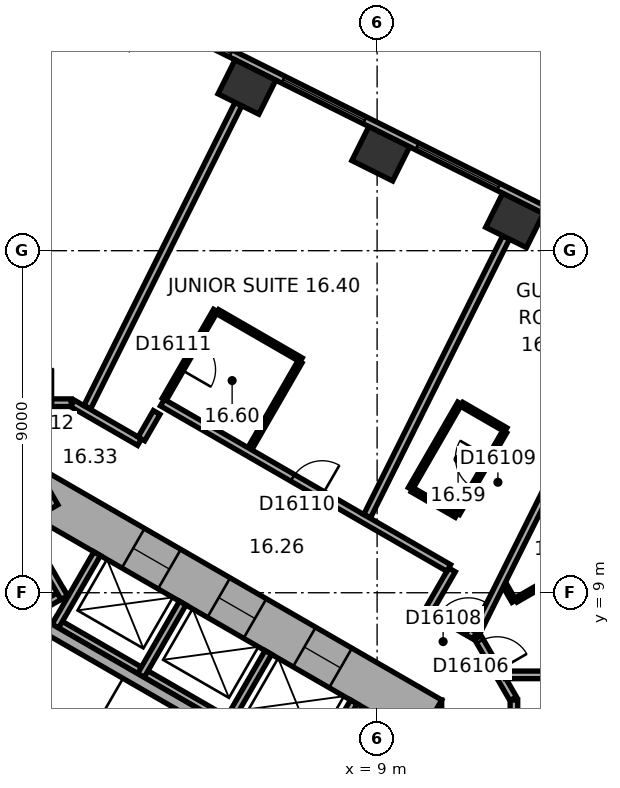
"""IFC4 building model, lengths in metres.
Left out: names, types, materials, properties, quantities, classifications, styles, units other than length and angle.
Written with IfcOpenShell. Run it as: python <this file> out.ifc"""

import sys

from ifc_helpers import new_model, si_unit, direction, frame, frame_2d, origin, origin_2d, place, context, subcontext, project, spatial, rectangle, extrude, element, fill, save


model = new_model("IFC4")
c1 = context("Model", 3, precision=1e-05, world=origin(), true_north=direction((0.0, 1.0)))
c2 = subcontext(c1, "Body", "Model", "MODEL_VIEW")
j1 = project(units=[si_unit("LENGTHUNIT", "METRE"), si_unit("PLANEANGLEUNIT", "RADIAN")], contexts=[c1])
p1 = place(None, origin())
s1 = spatial("IfcSite", under=j1, at=p1, CompositionType="ELEMENT")
p2 = place(p1, origin())
s2 = spatial("IfcBuilding", under=s1, at=p2, CompositionType="ELEMENT")
p3 = place(p2, frame((0.0, 0.0, 73.7)))
s3 = spatial("IfcBuildingStorey", under=s2, at=p3, CompositionType="ELEMENT", Elevation=73.7)
for number, where, z_axis, x_axis in (
    (1, (12.616, 18.795, 0.0), (0.0, 0.0, 1.0), (-0.895, 0.446, 0.0)),
    (2, (9.095, 20.551, 0.0), (0.0, 0.0, 1.0), (-0.895, 0.446, 0.0)),
    (3, (5.574, 22.306, 0.0), (0.0, 0.0, 1.0), (-0.895, 0.446, 0.0)),
):
    element("IfcColumn", number, at=place(p3, frame(where, z_axis=z_axis, x_axis=x_axis)), inside=s3, PredefinedType="COLUMN", context=c2, shape_type="SweptSolid", body=[
        extrude(rectangle(XDim=1.2, YDim=1.0, at=origin_2d()), origin(), (0.0, 0.0, 1.0), 3.3),
    ])
p4 = place(p3, frame((10.1, -6.177, 0.0), z_axis=(0.0, 0.0, 1.0), x_axis=(0.0, 1.0, 0.0)))
e4 = element("IfcWall", 4, at=p4, inside=s3, PredefinedType="SHEAR", context=c2, shape_type="SweptSolid", body=[
    extrude(rectangle(XDim=12.355, YDim=1.2, at=frame_2d((6.177, 0.0))), origin(), (0.0, 0.0, 1.0), 3.3),
])
p5 = place(p4, frame((6.378, 0.0, 0.0)))
e5 = element("IfcOpeningElement", 5, at=p5, cuts=e4, PredefinedType="OPENING", context=c2, shape_type="SweptSolid", body=[
    extrude(rectangle(XDim=1.5, YDim=2.1, at=frame_2d((0.75, 1.05))), frame((0.0, 0.61, 0.0), z_axis=(0.0, -1.0, 0.0), x_axis=(1.0, 0.0, 0.0)), (0.0, 0.0, 1.0), 1.22),
])
p6 = place(p4, frame((1.828, 0.0, 0.0)))
e6 = element("IfcOpeningElement", 6, at=p6, cuts=e4, PredefinedType="OPENING", context=c2, shape_type="SweptSolid", body=[
    extrude(rectangle(XDim=1.1, YDim=2.1, at=frame_2d((0.55, 1.05))), frame((0.0, 0.61, 0.0), z_axis=(0.0, -1.0, 0.0), x_axis=(1.0, 0.0, 0.0)), (0.0, 0.0, 1.0), 1.22),
])
p7 = place(p4, frame((4.427, 0.0, 0.0)))
e7 = element("IfcOpeningElement", 7, at=p7, cuts=e4, PredefinedType="OPENING", context=c2, shape_type="SweptSolid", body=[
    extrude(rectangle(XDim=1.1, YDim=2.1, at=frame_2d((0.55, 1.05))), frame((0.0, 0.61, 0.0), z_axis=(0.0, -1.0, 0.0), x_axis=(1.0, 0.0, 0.0)), (0.0, 0.0, 1.0), 1.22),
])
p8 = place(p3, frame((10.4, 5.658, 0.0), z_axis=(0.0, 0.0, 1.0), x_axis=(-0.866021384402, 0.500006961711, 0.0)))
e8 = element("IfcWall", 8, at=p8, inside=s3, PredefinedType="SHEAR", context=c2, shape_type="SweptSolid", body=[
    extrude(rectangle(XDim=12.355, YDim=1.2, at=frame_2d((6.178, 0.0))), origin(), (0.0, 0.0, 1.0), 3.3),
])
p9 = place(p8, frame((2.728, 0.0, 0.0)))
e9 = element("IfcOpeningElement", 9, at=p9, cuts=e8, PredefinedType="OPENING", context=c2, shape_type="SweptSolid", body=[
    extrude(rectangle(XDim=1.1, YDim=2.1, at=frame_2d((0.55, 1.05))), frame((0.0, 0.61, 0.0), z_axis=(0.0, -1.0, 0.0), x_axis=(1.0, 0.0, 0.0)), (0.0, 0.0, 1.0), 1.22),
])
p10 = place(p8, frame((5.328, 0.0, 0.0)))
e10 = element("IfcOpeningElement", 10, at=p10, cuts=e8, PredefinedType="OPENING", context=c2, shape_type="SweptSolid", body=[
    extrude(rectangle(XDim=1.1, YDim=2.1, at=frame_2d((0.55, 1.05))), frame((0.0, 0.61, 0.0), z_axis=(0.0, -1.0, 0.0), x_axis=(1.0, 0.0, 0.0)), (0.0, 0.0, 1.0), 1.22),
])
p11 = place(p8, frame((7.928, 0.0, 0.0)))
e11 = element("IfcOpeningElement", 11, at=p11, cuts=e8, PredefinedType="OPENING", context=c2, shape_type="SweptSolid", body=[
    extrude(rectangle(XDim=1.1, YDim=2.1, at=frame_2d((0.55, 1.05))), frame((0.0, 0.61, 0.0), z_axis=(0.0, -1.0, 0.0), x_axis=(1.0, 0.0, 0.0)), (0.0, 0.0, 1.0), 1.22),
])
p12 = place(p3, frame((0.3, 11.836, 0.0), z_axis=(0.0, 0.0, 1.0), x_axis=(-0.866021384402, -0.500006961711, 0.0)))
e12 = element("IfcWall", 12, at=p12, inside=s3, PredefinedType="SHEAR", context=c2, shape_type="SweptSolid", body=[
    extrude(rectangle(XDim=12.355, YDim=1.2, at=frame_2d((6.178, 0.0))), origin(), (0.0, 0.0, 1.0), 3.3),
])
p13 = place(p12, frame((6.378, 0.0, 0.0)))
e13 = element("IfcOpeningElement", 13, at=p13, cuts=e12, PredefinedType="OPENING", context=c2, shape_type="SweptSolid", body=[
    extrude(rectangle(XDim=1.5, YDim=2.1, at=frame_2d((0.75, 1.05))), frame((0.0, 0.61, 0.0), z_axis=(0.0, -1.0, 0.0), x_axis=(1.0, 0.0, 0.0)), (0.0, 0.0, 1.0), 1.22),
])
p14 = place(p12, frame((1.828, 0.0, 0.0)))
e14 = element("IfcOpeningElement", 14, at=p14, cuts=e12, PredefinedType="OPENING", context=c2, shape_type="SweptSolid", body=[
    extrude(rectangle(XDim=1.1, YDim=2.1, at=frame_2d((0.55, 1.05))), frame((0.0, 0.61, 0.0), z_axis=(0.0, -1.0, 0.0), x_axis=(1.0, 0.0, 0.0)), (0.0, 0.0, 1.0), 1.22),
])
p15 = place(p3, frame((20.63, 15.47, 0.0), z_axis=(0.0, 0.0, 1.0), x_axis=(-0.894934518609, 0.446197498203, 0.0)))
e15 = element("IfcWall", 15, at=p15, inside=s3, PredefinedType="STANDARD", context=c2, shape_type="SweptSolid", body=[
    extrude(rectangle(XDim=21.246, YDim=0.2, at=frame_2d((10.623, 0.0))), origin(), (0.0, 0.0, 1.0), 3.3),
])
p16 = place(p15, frame((1.553, 0.0, 0.8)))
e16 = element("IfcOpeningElement", 16, at=p16, cuts=e15, PredefinedType="OPENING", context=c2, shape_type="SweptSolid", body=[
    extrude(rectangle(XDim=2.4, YDim=1.7, at=frame_2d((1.2, 0.85))), frame((0.0, 0.11, 0.0), z_axis=(0.0, -1.0, 0.0), x_axis=(1.0, 0.0, 0.0)), (0.0, 0.0, 1.0), 0.22),
])
p17 = place(p15, frame((5.488, 0.0, 0.8)))
e17 = element("IfcOpeningElement", 17, at=p17, cuts=e15, PredefinedType="OPENING", context=c2, shape_type="SweptSolid", body=[
    extrude(rectangle(XDim=2.4, YDim=1.7, at=frame_2d((1.2, 0.85))), frame((0.0, 0.11, 0.0), z_axis=(0.0, -1.0, 0.0), x_axis=(1.0, 0.0, 0.0)), (0.0, 0.0, 1.0), 0.22),
])
p18 = place(p15, frame((9.422, 0.0, 0.8)))
e18 = element("IfcOpeningElement", 18, at=p18, cuts=e15, PredefinedType="OPENING", context=c2, shape_type="SweptSolid", body=[
    extrude(rectangle(XDim=2.4, YDim=1.7, at=frame_2d((1.2, 0.85))), frame((0.0, 0.11, 0.0), z_axis=(0.0, -1.0, 0.0), x_axis=(1.0, 0.0, 0.0)), (0.0, 0.0, 1.0), 0.22),
])
p19 = place(p15, frame((13.357, 0.0, 0.8)))
e19 = element("IfcOpeningElement", 19, at=p19, cuts=e15, PredefinedType="OPENING", context=c2, shape_type="SweptSolid", body=[
    extrude(rectangle(XDim=2.4, YDim=1.7, at=frame_2d((1.2, 0.85))), frame((0.0, 0.11, 0.0), z_axis=(0.0, -1.0, 0.0), x_axis=(1.0, 0.0, 0.0)), (0.0, 0.0, 1.0), 0.22),
])
p20 = place(p15, frame((17.292, 0.0, 0.8)))
e20 = element("IfcOpeningElement", 20, at=p20, cuts=e15, PredefinedType="OPENING", context=c2, shape_type="SweptSolid", body=[
    extrude(rectangle(XDim=2.4, YDim=1.7, at=frame_2d((1.2, 0.85))), frame((0.0, 0.11, 0.0), z_axis=(0.0, -1.0, 0.0), x_axis=(1.0, 0.0, 0.0)), (0.0, 0.0, 1.0), 0.22),
])
p21 = place(p3, frame((7.424, 4.259, 0.0), z_axis=(0.0, 0.0, 1.0), x_axis=(-0.866026010844, 0.49999894854, 0.0)))
e21 = element("IfcWall", 21, at=p21, inside=s3, PredefinedType="PARTITIONING", context=c2, shape_type="SweptSolid", body=[
    extrude(rectangle(XDim=8.0, YDim=0.2, at=frame_2d((4.0, 0.0))), origin(), (0.0, 0.0, 1.0), 2.95),
])
for number, where, z_axis, x_axis in (
    (22, (7.287, 4.222, 0.0), (0.0, 0.0, 1.0), (0.5, 0.866, 0.0)),
    (23, (5.036, 5.522, 0.0), (0.0, 0.0, 1.0), (0.5, 0.866, 0.0)),
    (24, (2.784, 6.822, 0.0), (0.0, 0.0, 1.0), (0.5, 0.866, 0.0)),
    (25, (0.532, 8.122, 0.0), (0.0, 0.0, 1.0), (0.5, 0.866, 0.0)),
):
    element("IfcWall", number, at=place(p3, frame(where, z_axis=z_axis, x_axis=x_axis)), inside=s3, PredefinedType="PARTITIONING", context=c2, shape_type="SweptSolid", body=[
        extrude(rectangle(XDim=2.2, YDim=0.2, at=frame_2d((1.1, 0.0))), origin(), (0.0, 0.0, 1.0), 2.95),
    ])
p22 = place(p3, frame((0.803, 9.009, 0.0), z_axis=(0.0, 0.0, 1.0), x_axis=(-0.866028230842, -0.499995103361, 0.0)))
e26 = element("IfcWall", 26, at=p22, inside=s3, PredefinedType="PARTITIONING", context=c2, shape_type="SweptSolid", body=[
    extrude(rectangle(XDim=5.4, YDim=0.2, at=frame_2d((2.7, 0.0))), origin(), (0.0, 0.0, 1.0), 2.95),
])
p23 = place(p3, frame((0.767, 8.872, 0.0), z_axis=(0.0, 0.0, 1.0), x_axis=(-0.499994660107, 0.866028486751, 0.0)))
e27 = element("IfcWall", 27, at=p23, inside=s3, PredefinedType="PARTITIONING", context=c2, shape_type="SweptSolid", body=[
    extrude(rectangle(XDim=2.2, YDim=0.2, at=frame_2d((1.1, 0.0))), origin(), (0.0, 0.0, 1.0), 2.95),
])
p24 = place(p3, frame((6.303, 4.617, 0.0), z_axis=(0.0, 0.0, 1.0), x_axis=(-0.866027801685, 0.499995846692, 0.0)))
e28 = element("IfcWall", 28, at=p24, inside=s3, PredefinedType="SHEAR", context=c2, shape_type="SweptSolid", body=[
    extrude(rectangle(XDim=7.06, YDim=0.3, at=frame_2d((3.53, 0.0))), origin(), (0.0, 0.0, 1.0), 2.95),
])
p25 = place(p3, frame((0.95, 14.001, 0.0), z_axis=(0.0, 0.0, 1.0), x_axis=(-1.0, 0.0, 0.0)))
e29 = element("IfcWall", 29, at=p25, inside=s3, PredefinedType="PARTITIONING", context=c2, shape_type="SweptSolid", body=[
    extrude(rectangle(XDim=1.86, YDim=0.2, at=frame_2d((0.93, 0.0))), origin(), (0.0, 0.0, 1.0), 2.95),
])
p26 = place(p25, frame((0.48, 0.0, 0.0)))
e30 = element("IfcOpeningElement", 30, at=p26, cuts=e29, PredefinedType="OPENING", context=c2, shape_type="SweptSolid", body=[
    extrude(rectangle(XDim=0.9, YDim=2.1, at=frame_2d((0.45, 1.05))), frame((0.0, 0.11, 0.0), z_axis=(0.0, -1.0, 0.0), x_axis=(1.0, 0.0, 0.0)), (0.0, 0.0, 1.0), 0.22),
])
p27 = place(p3, frame((2.748, 12.962, 0.0), z_axis=(0.0, 0.0, 1.0), x_axis=(-0.866013897511, 0.50001992892, 0.0)))
e31 = element("IfcWall", 31, at=p27, inside=s3, PredefinedType="PARTITIONING", context=c2, shape_type="SweptSolid", body=[
    extrude(rectangle(XDim=2.037, YDim=0.2, at=frame_2d((1.018, 0.0))), origin(), (0.0, 0.0, 1.0), 2.95),
])
p28 = place(p3, frame((3.199, 13.743, 0.0), z_axis=(0.0, 0.0, 1.0), x_axis=(-0.500170954823, -0.865926680471, 0.0)))
e32 = element("IfcWall", 32, at=p28, inside=s3, PredefinedType="PARTITIONING", context=c2, shape_type="SweptSolid", body=[
    extrude(rectangle(XDim=0.801, YDim=0.2, at=frame_2d((0.4, 0.0))), origin(), (0.0, 0.0, 1.0), 2.95),
])
p29 = place(p3, frame((3.399, 14.089, 0.0), z_axis=(0.0, 0.0, 1.0), x_axis=(0.4999416173, 0.866059108428, 0.0)))
e33 = element("IfcWall", 33, at=p29, inside=s3, PredefinedType="PARTITIONING", context=c2, shape_type="SweptSolid", body=[
    extrude(rectangle(XDim=2.7, YDim=0.12, at=frame_2d((1.35, 0.0))), origin(), (0.0, 0.0, 1.0), 2.95),
])
p30 = place(p29, frame((0.9, 0.0, 0.0)))
e34 = element("IfcOpeningElement", 34, at=p30, cuts=e33, PredefinedType="OPENING", context=c2, shape_type="SweptSolid", body=[
    extrude(rectangle(XDim=0.9, YDim=2.1, at=frame_2d((0.45, 1.05))), frame((0.0, 0.07, 0.0), z_axis=(0.0, -1.0, 0.0), x_axis=(1.0, 0.0, 0.0)), (0.0, 0.0, 1.0), 0.14),
])
p31 = place(p3, frame((4.801, 16.397, 0.0), z_axis=(0.0, 0.0, 1.0), x_axis=(0.866022320763, -0.500005339912, 0.0)))
e35 = element("IfcWall", 35, at=p31, inside=s3, PredefinedType="PARTITIONING", context=c2, shape_type="SweptSolid", body=[
    extrude(rectangle(XDim=2.54, YDim=0.12, at=frame_2d((1.27, 0.0))), origin(), (0.0, 0.0, 1.0), 2.95),
])
p32 = place(p3, frame((5.351, 21.859, 0.0), z_axis=(0.0, 0.0, 1.0), x_axis=(-0.446205309328, -0.894930624086, 0.0)))
e36 = element("IfcWall", 36, at=p32, inside=s3, PredefinedType="PARTITIONING", context=c2, shape_type="SweptSolid", body=[
    extrude(rectangle(XDim=8.913, YDim=0.2, at=frame_2d((4.457, 0.0))), origin(), (0.0, 0.0, 1.0), 2.15),
])
p33 = place(p3, frame((6.971, 15.075, 0.0), z_axis=(0.0, 0.0, 1.0), x_axis=(-0.500007957085, -0.86602080971, 0.0)))
e37 = element("IfcWall", 37, at=p33, inside=s3, PredefinedType="PARTITIONING", context=c2, shape_type="SweptSolid", body=[
    extrude(rectangle(XDim=2.64, YDim=0.12, at=frame_2d((1.32, 0.0))), origin(), (0.0, 0.0, 1.0), 2.95),
])
p34 = place(p3, frame((9.875, 11.736, 0.0), z_axis=(0.0, 0.0, 1.0), x_axis=(0.499936506574, 0.866062058628, 0.0)))
e38 = element("IfcWall", 38, at=p34, inside=s3, PredefinedType="PARTITIONING", context=c2, shape_type="SweptSolid", body=[
    extrude(rectangle(XDim=2.6, YDim=0.12, at=frame_2d((1.3, 0.0))), origin(), (0.0, 0.0, 1.0), 2.95),
])
p35 = place(p3, frame((10.371, 8.561, 0.0), z_axis=(0.0, 0.0, 1.0), x_axis=(0.499986357472, 0.866033280158, 0.0)))
e39 = element("IfcWall", 39, at=p35, inside=s3, PredefinedType="PARTITIONING", context=c2, shape_type="SweptSolid", body=[
    extrude(rectangle(XDim=1.201, YDim=0.2, at=frame_2d((0.601, 0.0))), origin(), (0.0, 0.0, 1.0), 2.95),
])
p36 = place(p3, frame((10.885, 9.652, 0.0), z_axis=(0.0, 0.0, 1.0), x_axis=(-0.866033277307, 0.499986362411, 0.0)))
e40 = element("IfcWall", 40, at=p36, inside=s3, PredefinedType="PARTITIONING", context=c2, shape_type="SweptSolid", body=[
    extrude(rectangle(XDim=8.702, YDim=0.2, at=frame_2d((4.351, 0.0))), origin(), (0.0, 0.0, 1.0), 2.95),
])
p37 = place(p36, frame((3.844, 0.0, 0.0)))
e41 = element("IfcOpeningElement", 41, at=p37, cuts=e40, PredefinedType="OPENING", context=c2, shape_type="SweptSolid", body=[
    extrude(rectangle(XDim=0.9, YDim=2.1, at=frame_2d((0.45, 1.05))), frame((0.0, 0.11, 0.0), z_axis=(0.0, -1.0, 0.0), x_axis=(1.0, 0.0, 0.0)), (0.0, 0.0, 1.0), 0.22),
])
for number, where, z_axis, x_axis in (
    (42, (11.087, 11.036, 0.0), (0.0, 0.0, 1.0), (-0.866, 0.5, 0.0)),
    (43, (11.226, 13.958, 0.0), (0.0, 0.0, 1.0), (0.866, -0.5, 0.0)),
):
    element("IfcWall", number, at=place(p3, frame(where, z_axis=z_axis, x_axis=x_axis)), inside=s3, PredefinedType="PARTITIONING", context=c2, shape_type="SweptSolid", body=[
        extrude(rectangle(XDim=1.34, YDim=0.12, at=frame_2d((0.67, 0.0))), origin(), (0.0, 0.0, 1.0), 2.95),
    ])
p38 = place(p3, frame((11.566, 7.871, 0.0), z_axis=(0.0, 0.0, 1.0), x_axis=(-0.866004557827, 0.500036104519, 0.0)))
e44 = element("IfcWall", 44, at=p38, inside=s3, PredefinedType="PARTITIONING", context=c2, shape_type="SweptSolid", body=[
    extrude(rectangle(XDim=1.28, YDim=0.2, at=frame_2d((0.64, 0.0))), origin(), (0.0, 0.0, 1.0), 2.95),
])
p39 = place(p38, frame((0.19, 0.0, 0.0)))
e45 = element("IfcOpeningElement", 45, at=p39, cuts=e44, PredefinedType="OPENING", context=c2, shape_type="SweptSolid", body=[
    extrude(rectangle(XDim=0.9, YDim=2.1, at=frame_2d((0.45, 1.05))), frame((0.0, 0.11, 0.0), z_axis=(0.0, -1.0, 0.0), x_axis=(1.0, 0.0, 0.0)), (0.0, 0.0, 1.0), 0.22),
])
p40 = place(p3, frame((12.357, 13.236, 0.0), z_axis=(0.0, 0.0, 1.0), x_axis=(-0.50000366821, -0.866023285932, 0.0)))
e46 = element("IfcWall", 46, at=p40, inside=s3, PredefinedType="PARTITIONING", context=c2, shape_type="SweptSolid", body=[
    extrude(rectangle(XDim=2.48, YDim=0.12, at=frame_2d((1.24, 0.0))), origin(), (0.0, 0.0, 1.0), 2.95),
])
p41 = place(p40, frame((0.79, 0.0, 0.0)))
e47 = element("IfcOpeningElement", 47, at=p41, cuts=e46, PredefinedType="OPENING", context=c2, shape_type="SweptSolid", body=[
    extrude(rectangle(XDim=0.9, YDim=2.1, at=frame_2d((0.45, 1.05))), frame((0.0, 0.07, 0.0), z_axis=(0.0, -1.0, 0.0), x_axis=(1.0, 0.0, 0.0)), (0.0, 0.0, 1.0), 0.14),
])
p42 = place(p3, frame((12.393, 18.348, 0.0), z_axis=(0.0, 0.0, 1.0), x_axis=(-0.446176022699, -0.894945225569, 0.0)))
e48 = element("IfcWall", 48, at=p42, inside=s3, PredefinedType="PARTITIONING", context=c2, shape_type="SweptSolid", body=[
    extrude(rectangle(XDim=8.191, YDim=0.2, at=frame_2d((4.095, 0.0))), origin(), (0.0, 0.0, 1.0), 2.15),
])
p43 = place(p3, frame((12.58, 6.212, 0.0), z_axis=(0.0, 0.0, 1.0), x_axis=(-0.500063286585, 0.865988862174, 0.0)))
e49 = element("IfcWall", 49, at=p43, inside=s3, PredefinedType="PARTITIONING", context=c2, shape_type="SweptSolid", body=[
    extrude(rectangle(XDim=1.86, YDim=0.2, at=frame_2d((0.93, 0.0))), origin(), (0.0, 0.0, 1.0), 2.95),
])
p44 = place(p43, frame((0.842, 0.0, 0.0)))
e50 = element("IfcOpeningElement", 50, at=p44, cuts=e49, PredefinedType="OPENING", context=c2, shape_type="SweptSolid", body=[
    extrude(rectangle(XDim=0.9, YDim=2.1, at=frame_2d((0.45, 1.05))), frame((0.0, 0.11, 0.0), z_axis=(0.0, -1.0, 0.0), x_axis=(1.0, 0.0, 0.0)), (0.0, 0.0, 1.0), 0.22),
])
p45 = place(p3, frame((12.6, 3.004, 0.0), z_axis=(0.0, 0.0, 1.0), x_axis=(0.0, 1.0, 0.0)))
e51 = element("IfcWall", 51, at=p45, inside=s3, PredefinedType="PARTITIONING", context=c2, shape_type="SweptSolid", body=[
    extrude(rectangle(XDim=3.173, YDim=0.2, at=frame_2d((1.586, 0.0))), origin(), (0.0, 0.0, 1.0), 2.95),
])
p46 = place(p45, frame((1.998, 0.0, 0.0)))
e52 = element("IfcOpeningElement", 52, at=p46, cuts=e51, PredefinedType="OPENING", context=c2, shape_type="SweptSolid", body=[
    extrude(rectangle(XDim=0.9, YDim=2.1, at=frame_2d((0.45, 1.05))), frame((0.0, 0.11, 0.0), z_axis=(0.0, -1.0, 0.0), x_axis=(1.0, 0.0, 0.0)), (0.0, 0.0, 1.0), 0.22),
])
p47 = place(p3, frame((12.601, 8.776, 0.0), z_axis=(0.0, 0.0, 1.0), x_axis=(-0.500166486798, 0.865929261247, 0.0)))
e53 = element("IfcWall", 53, at=p47, inside=s3, PredefinedType="PARTITIONING", context=c2, shape_type="SweptSolid", body=[
    extrude(rectangle(XDim=0.476, YDim=0.12, at=frame_2d((0.238, 0.0))), origin(), (0.0, 0.0, 1.0), 2.95),
])
p48 = place(p3, frame((14.974, 10.146, 0.0), z_axis=(0.0, 0.0, 1.0), x_axis=(-0.86599746015, -0.500048396672, 0.0)))
e54 = element("IfcWall", 54, at=p48, inside=s3, PredefinedType="PARTITIONING", context=c2, shape_type="SweptSolid", body=[
    extrude(rectangle(XDim=2.68, YDim=0.12, at=frame_2d((1.34, 0.0))), origin(), (0.0, 0.0, 1.0), 2.95),
])
p49 = place(p48, frame((0.69, 0.0, 0.0)))
e55 = element("IfcOpeningElement", 55, at=p49, cuts=e54, PredefinedType="OPENING", context=c2, shape_type="SweptSolid", body=[
    extrude(rectangle(XDim=0.9, YDim=2.1, at=frame_2d((0.45, 1.05))), frame((0.0, 0.07, 0.0), z_axis=(0.0, -1.0, 0.0), x_axis=(1.0, 0.0, 0.0)), (0.0, 0.0, 1.0), 0.14),
])
p50 = place(p3, frame((15.915, 16.592, 0.0), z_axis=(0.0, 0.0, 1.0), x_axis=(-0.446199736347, -0.894933402709, 0.0)))
e56 = element("IfcWall", 56, at=p50, inside=s3, PredefinedType="PARTITIONING", context=c2, shape_type="SweptSolid", body=[
    extrude(rectangle(XDim=9.635, YDim=0.2, at=frame_2d((4.817, 0.0))), origin(), (0.0, 0.0, 1.0), 2.95),
])
p51 = place(p3, frame((21.95, 6.839, 0.0), z_axis=(0.0, 0.0, 1.0), x_axis=(-1.0, 0.0, 0.0)))
e57 = element("IfcWall", 57, at=p51, inside=s3, PredefinedType="PARTITIONING", context=c2, shape_type="SweptSolid", body=[
    extrude(rectangle(XDim=9.572, YDim=0.2, at=frame_2d((4.786, 0.0))), origin(), (0.0, 0.0, 1.0), 2.95),
])
p52 = place(p18, origin())
e58 = element("IfcWindow", 58, at=p52, inside=s3, PartitioningType="SINGLE_PANEL", PredefinedType="WINDOW", context=c2, shape_type="SweptSolid", body=[
    extrude(rectangle(XDim=2.4, YDim=1.7, at=frame_2d((1.2, 0.85))), frame((0.0, 0.03, 0.0), z_axis=(0.0, -1.0, 0.0), x_axis=(1.0, 0.0, 0.0)), (0.0, 0.0, 1.0), 0.06),
])
fill(e18, e58)
p53 = place(p19, origin())
e59 = element("IfcWindow", 59, at=p53, inside=s3, PartitioningType="SINGLE_PANEL", PredefinedType="WINDOW", context=c2, shape_type="SweptSolid", body=[
    extrude(rectangle(XDim=2.4, YDim=1.7, at=frame_2d((1.2, 0.85))), frame((0.0, 0.03, 0.0), z_axis=(0.0, -1.0, 0.0), x_axis=(1.0, 0.0, 0.0)), (0.0, 0.0, 1.0), 0.06),
])
fill(e19, e59)
p54 = place(p20, origin())
e60 = element("IfcWindow", 60, at=p54, inside=s3, PartitioningType="SINGLE_PANEL", PredefinedType="WINDOW", context=c2, shape_type="SweptSolid", body=[
    extrude(rectangle(XDim=2.4, YDim=1.7, at=frame_2d((1.2, 0.85))), frame((0.0, 0.03, 0.0), z_axis=(0.0, -1.0, 0.0), x_axis=(1.0, 0.0, 0.0)), (0.0, 0.0, 1.0), 0.06),
])
fill(e20, e60)
p55 = place(p9, origin())
e61 = element("IfcDoor", 61, at=p55, inside=s3, OperationType="DOUBLE_DOOR_SLIDING", PredefinedType="DOOR", context=c2, shape_type="SweptSolid", body=[
    extrude(rectangle(XDim=1.1, YDim=2.1, at=frame_2d((0.55, 1.05))), frame((0.0, 0.025, 0.0), z_axis=(0.0, -1.0, 0.0), x_axis=(1.0, 0.0, 0.0)), (0.0, 0.0, 1.0), 0.05),
])
fill(e9, e61)
p56 = place(p10, origin())
e62 = element("IfcDoor", 62, at=p56, inside=s3, OperationType="DOUBLE_DOOR_SLIDING", PredefinedType="DOOR", context=c2, shape_type="SweptSolid", body=[
    extrude(rectangle(XDim=1.1, YDim=2.1, at=frame_2d((0.55, 1.05))), frame((0.0, 0.025, 0.0), z_axis=(0.0, -1.0, 0.0), x_axis=(1.0, 0.0, 0.0)), (0.0, 0.0, 1.0), 0.05),
])
fill(e10, e62)
p57 = place(p11, origin())
e63 = element("IfcDoor", 63, at=p57, inside=s3, OperationType="DOUBLE_DOOR_SLIDING", PredefinedType="DOOR", context=c2, shape_type="SweptSolid", body=[
    extrude(rectangle(XDim=1.1, YDim=2.1, at=frame_2d((0.55, 1.05))), frame((0.0, 0.025, 0.0), z_axis=(0.0, -1.0, 0.0), x_axis=(1.0, 0.0, 0.0)), (0.0, 0.0, 1.0), 0.05),
])
fill(e11, e63)
p58 = place(p44, origin())
e64 = element("IfcDoor", 64, at=p58, inside=s3, OperationType="SINGLE_SWING_LEFT", PredefinedType="DOOR", context=c2, shape_type="SweptSolid", body=[
    extrude(rectangle(XDim=0.9, YDim=2.1, at=frame_2d((0.45, 1.05))), frame((0.0, 0.025, 0.0), z_axis=(0.0, -1.0, 0.0), x_axis=(1.0, 0.0, 0.0)), (0.0, 0.0, 1.0), 0.05),
])
fill(e50, e64)
p59 = place(p39, origin())
e65 = element("IfcDoor", 65, at=p59, inside=s3, OperationType="SINGLE_SWING_LEFT", PredefinedType="DOOR", context=c2, shape_type="SweptSolid", body=[
    extrude(rectangle(XDim=0.9, YDim=2.1, at=frame_2d((0.45, 1.05))), frame((0.0, 0.025, 0.0), z_axis=(0.0, -1.0, 0.0), x_axis=(1.0, 0.0, 0.0)), (0.0, 0.0, 1.0), 0.05),
])
fill(e45, e65)
p60 = place(p41, origin())
e66 = element("IfcDoor", 66, at=p60, inside=s3, OperationType="SINGLE_SWING_LEFT", PredefinedType="DOOR", context=c2, shape_type="SweptSolid", body=[
    extrude(rectangle(XDim=0.9, YDim=2.1, at=frame_2d((0.45, 1.05))), frame((0.0, 0.025, 0.0), z_axis=(0.0, -1.0, 0.0), x_axis=(1.0, 0.0, 0.0)), (0.0, 0.0, 1.0), 0.05),
])
fill(e47, e66)
p61 = place(p37, origin())
e67 = element("IfcDoor", 67, at=p61, inside=s3, OperationType="SINGLE_SWING_LEFT", PredefinedType="DOOR", context=c2, shape_type="SweptSolid", body=[
    extrude(rectangle(XDim=0.9, YDim=2.1, at=frame_2d((0.45, 1.05))), frame((0.0, 0.025, 0.0), z_axis=(0.0, -1.0, 0.0), x_axis=(1.0, 0.0, 0.0)), (0.0, 0.0, 1.0), 0.05),
])
fill(e41, e67)
p62 = place(p30, origin())
e68 = element("IfcDoor", 68, at=p62, inside=s3, OperationType="SINGLE_SWING_LEFT", PredefinedType="DOOR", context=c2, shape_type="SweptSolid", body=[
    extrude(rectangle(XDim=0.9, YDim=2.1, at=frame_2d((0.45, 1.05))), frame((0.0, 0.025, 0.0), z_axis=(0.0, -1.0, 0.0), x_axis=(1.0, 0.0, 0.0)), (0.0, 0.0, 1.0), 0.05),
])
fill(e34, e68)
p63 = place(p26, origin())
e69 = element("IfcDoor", 69, at=p63, inside=s3, OperationType="SINGLE_SWING_LEFT", PredefinedType="DOOR", context=c2, shape_type="SweptSolid", body=[
    extrude(rectangle(XDim=0.9, YDim=2.1, at=frame_2d((0.45, 1.05))), frame((0.0, 0.025, 0.0), z_axis=(0.0, -1.0, 0.0), x_axis=(1.0, 0.0, 0.0)), (0.0, 0.0, 1.0), 0.05),
])
fill(e30, e69)
save(model, sys.argv[1])
